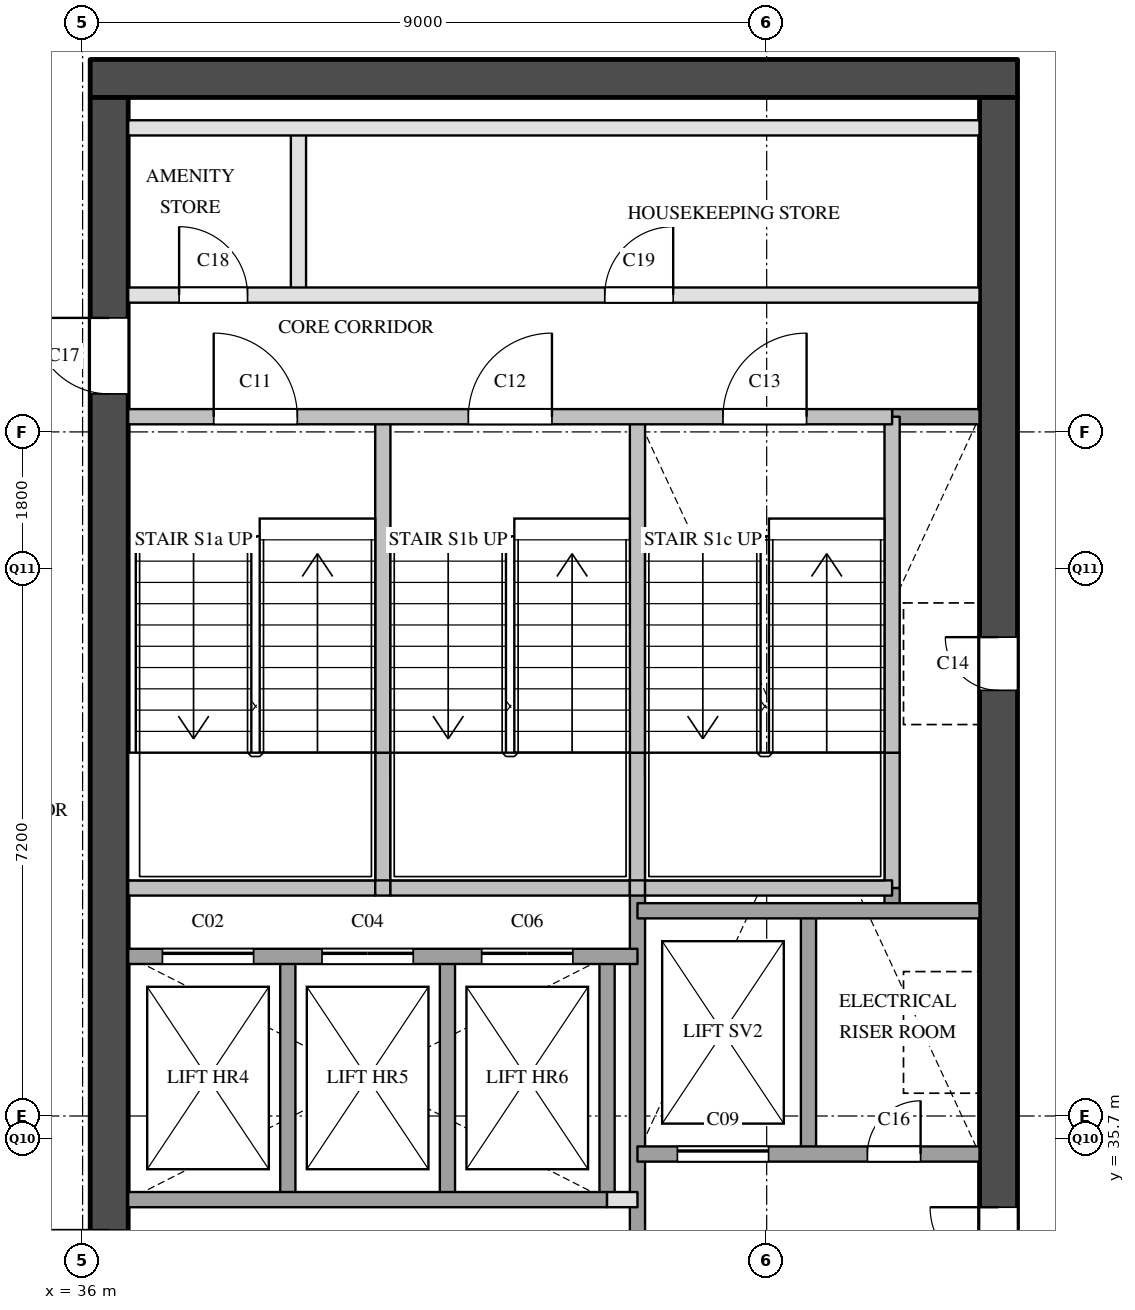
"""IFC4 building model, lengths in metres.
Left out: names, types, materials, properties, quantities, classifications, styles, units other than length and angle.
Written with IfcOpenShell. Run it as: python <this file> out.ifc"""

import sys

from ifc_helpers import new_model, si_unit, direction, frame, frame_2d, origin, place, context, subcontext, project, spatial, rectangle, extrude, element, fill, save


model = new_model("IFC4")
c1 = context("Model", 3, precision=1e-05, world=origin(), true_north=direction((0.0, 1.0)))
c2 = subcontext(c1, "Body", "Model", "MODEL_VIEW")
j1 = project(units=[si_unit("LENGTHUNIT", "METRE"), si_unit("PLANEANGLEUNIT", "RADIAN")], contexts=[c1])
p1 = place(None, origin())
s1 = spatial("IfcSite", under=j1, at=p1, CompositionType="ELEMENT")
p2 = place(p1, origin())
s2 = spatial("IfcBuilding", under=s1, at=p2, CompositionType="ELEMENT")
p3 = place(p2, frame((0.0, 0.0, 134.9)))
s3 = spatial("IfcBuildingStorey", under=s2, at=p3, CompositionType="ELEMENT", Elevation=134.9)
p4 = place(p3, frame((36.1, 49.65, 0.0), z_axis=(0.0, 0.0, 1.0), x_axis=(1.0, 0.0, 0.0)))
e1 = element("IfcWall", 1, at=p4, inside=s3, PredefinedType="SHEAR", context=c2, shape_type="SweptSolid", body=[
    extrude(rectangle(XDim=12.2, YDim=0.5, at=frame_2d((6.1, 0.0))), origin(), (0.0, 0.0, 1.0), 3.6),
])
p5 = place(p3, frame((36.35, 29.1, 0.0), z_axis=(0.0, 0.0, 1.0), x_axis=(0.0, 1.0, 0.0)))
e2 = element("IfcWall", 2, at=p5, inside=s3, PredefinedType="SHEAR", context=c2, shape_type="SweptSolid", body=[
    extrude(rectangle(XDim=20.3, YDim=0.5, at=frame_2d((10.15, 0.0))), origin(), (0.0, 0.0, 1.0), 3.6),
])
p6 = place(p5, frame((3.6, 0.0, 0.0)))
e3 = element("IfcOpeningElement", 3, at=p6, cuts=e2, PredefinedType="OPENING", context=c2, shape_type="SweptSolid", body=[
    extrude(rectangle(XDim=1.8, YDim=2.1, at=frame_2d((0.9, 1.05))), frame((0.0, 0.26, 0.0), z_axis=(0.0, -1.0, 0.0), x_axis=(1.0, 0.0, 0.0)), (0.0, 0.0, 1.0), 0.52),
])
p7 = place(p5, frame((16.4, 0.0, 0.0)))
e4 = element("IfcOpeningElement", 4, at=p7, cuts=e2, PredefinedType="OPENING", context=c2, shape_type="SweptSolid", body=[
    extrude(rectangle(XDim=1.0, YDim=2.1, at=frame_2d((0.5, 1.05))), frame((0.0, 0.26, 0.0), z_axis=(0.0, -1.0, 0.0), x_axis=(1.0, 0.0, 0.0)), (0.0, 0.0, 1.0), 0.52),
])
p8 = place(p3, frame((48.05, 29.1, 0.0), z_axis=(0.0, 0.0, 1.0), x_axis=(0.0, 1.0, 0.0)))
e5 = element("IfcWall", 5, at=p8, inside=s3, PredefinedType="SHEAR", context=c2, shape_type="SweptSolid", body=[
    extrude(rectangle(XDim=20.3, YDim=0.5, at=frame_2d((10.15, 0.0))), origin(), (0.0, 0.0, 1.0), 3.6),
])
p9 = place(p8, frame((12.5, 0.0, 0.0)))
e6 = element("IfcOpeningElement", 6, at=p9, cuts=e5, PredefinedType="OPENING", context=c2, shape_type="SweptSolid", body=[
    extrude(rectangle(XDim=0.7, YDim=2.1, at=frame_2d((0.35, 1.05))), frame((0.0, 0.26, 0.0), z_axis=(0.0, -1.0, 0.0), x_axis=(1.0, 0.0, 0.0)), (0.0, 0.0, 1.0), 0.52),
])
p10 = place(p8, frame((3.9, 0.0, 0.0)))
e7 = element("IfcOpeningElement", 7, at=p10, cuts=e5, PredefinedType="OPENING", context=c2, shape_type="SweptSolid", body=[
    extrude(rectangle(XDim=1.8, YDim=2.1, at=frame_2d((0.9, 1.05))), frame((0.0, 0.26, 0.0), z_axis=(0.0, -1.0, 0.0), x_axis=(1.0, 0.0, 0.0)), (0.0, 0.0, 1.0), 0.52),
])
p11 = place(p3, frame((38.7, 34.9, 0.0), z_axis=(0.0, 0.0, 1.0), x_axis=(0.0, 1.0, 0.0)))
e8 = element("IfcWall", 8, at=p11, inside=s3, PredefinedType="SOLIDWALL", context=c2, shape_type="SweptSolid", body=[
    extrude(rectangle(XDim=3.2, YDim=0.2, at=frame_2d((1.6, 0.0))), origin(), (0.0, 0.0, 1.0), 3.6),
])
p12 = place(p3, frame((38.84, 46.8, 0.0), z_axis=(0.0, 0.0, 1.0), x_axis=(0.0, 1.0, 0.0)))
e9 = element("IfcWall", 9, at=p12, inside=s3, PredefinedType="PARTITIONING", context=c2, shape_type="SweptSolid", body=[
    extrude(rectangle(XDim=2.2, YDim=0.2, at=frame_2d((1.1, 0.0))), origin(), (0.0, 0.0, 1.0), 3.6),
])
p13 = place(p3, frame((39.95, 39.0, 0.0), z_axis=(0.0, 0.0, 1.0), x_axis=(0.0, 1.0, 0.0)))
e10 = element("IfcWall", 10, at=p13, inside=s3, PredefinedType="SOLIDWALL", context=c2, shape_type="SweptSolid", body=[
    extrude(rectangle(XDim=1.78, YDim=0.2, at=frame_2d((0.89, 0.0))), origin(), (0.0, 0.0, 1.0), 3.6),
])
p14 = place(p3, frame((39.95, 40.78, 0.0), z_axis=(0.0, 0.0, 1.0), x_axis=(0.0, 1.0, 0.0)))
e11 = element("IfcWall", 11, at=p14, inside=s3, PredefinedType="SOLIDWALL", context=c2, shape_type="SweptSolid", body=[
    extrude(rectangle(XDim=4.42, YDim=0.2, at=frame_2d((2.21, 0.0))), origin(), (0.0, 0.0, 1.0), 3.6),
])
for number, where, z_axis, x_axis in (
    (12, (40.8, 34.9, 0.0), (0.0, 0.0, 1.0), (0.0, 1.0, 0.0)),
    (13, (42.9, 34.9, 0.0), (0.0, 0.0, 1.0), (0.0, 1.0, 0.0)),
):
    element("IfcWall", number, at=place(p3, frame(where, z_axis=z_axis, x_axis=x_axis)), inside=s3, PredefinedType="SOLIDWALL", context=c2, shape_type="SweptSolid", body=[
        extrude(rectangle(XDim=3.2, YDim=0.2, at=frame_2d((1.6, 0.0))), origin(), (0.0, 0.0, 1.0), 3.6),
    ])
p15 = place(p3, frame((43.3, 29.1, 0.0), z_axis=(0.0, 0.0, 1.0), x_axis=(0.0, 1.0, 0.0)))
e14 = element("IfcWall", 14, at=p15, inside=s3, PredefinedType="SOLIDWALL", context=c2, shape_type="SweptSolid", body=[
    extrude(rectangle(XDim=9.9, YDim=0.2, at=frame_2d((4.95, 0.0))), origin(), (0.0, 0.0, 1.0), 3.6),
])
p16 = place(p3, frame((43.3, 39.0, 0.0), z_axis=(0.0, 0.0, 1.0), x_axis=(0.0, 1.0, 0.0)))
e15 = element("IfcWall", 15, at=p16, inside=s3, PredefinedType="SOLIDWALL", context=c2, shape_type="SweptSolid", body=[
    extrude(rectangle(XDim=1.78, YDim=0.2, at=frame_2d((0.89, 0.0))), origin(), (0.0, 0.0, 1.0), 3.6),
])
p17 = place(p3, frame((43.3, 40.78, 0.0), z_axis=(0.0, 0.0, 1.0), x_axis=(0.0, 1.0, 0.0)))
e16 = element("IfcWall", 16, at=p17, inside=s3, PredefinedType="SOLIDWALL", context=c2, shape_type="SweptSolid", body=[
    extrude(rectangle(XDim=4.42, YDim=0.2, at=frame_2d((2.21, 0.0))), origin(), (0.0, 0.0, 1.0), 3.6),
])
p18 = place(p3, frame((45.55, 35.5, 0.0), z_axis=(0.0, 0.0, 1.0), x_axis=(0.0, 1.0, 0.0)))
e17 = element("IfcWall", 17, at=p18, inside=s3, PredefinedType="SOLIDWALL", context=c2, shape_type="SweptSolid", body=[
    extrude(rectangle(XDim=3.2, YDim=0.2, at=frame_2d((1.6, 0.0))), origin(), (0.0, 0.0, 1.0), 3.6),
])
p19 = place(p3, frame((46.65, 38.7, 0.0), z_axis=(0.0, 0.0, 1.0), x_axis=(0.0, 1.0, 0.0)))
e18 = element("IfcWall", 18, at=p19, inside=s3, PredefinedType="SOLIDWALL", context=c2, shape_type="SweptSolid", body=[
    extrude(rectangle(XDim=0.3, YDim=0.2, at=frame_2d((0.15, 0.0))), origin(), (0.0, 0.0, 1.0), 3.6),
])
p20 = place(p3, frame((46.65, 39.0, 0.0), z_axis=(0.0, 0.0, 1.0), x_axis=(0.0, 1.0, 0.0)))
e19 = element("IfcWall", 19, at=p20, inside=s3, PredefinedType="SOLIDWALL", context=c2, shape_type="SweptSolid", body=[
    extrude(rectangle(XDim=1.78, YDim=0.2, at=frame_2d((0.89, 0.0))), origin(), (0.0, 0.0, 1.0), 3.6),
])
p21 = place(p3, frame((46.65, 40.78, 0.0), z_axis=(0.0, 0.0, 1.0), x_axis=(0.0, 1.0, 0.0)))
e20 = element("IfcWall", 20, at=p21, inside=s3, PredefinedType="SOLIDWALL", context=c2, shape_type="SweptSolid", body=[
    extrude(rectangle(XDim=4.42, YDim=0.2, at=frame_2d((2.21, 0.0))), origin(), (0.0, 0.0, 1.0), 3.6),
])
p22 = place(p3, frame((42.9, 34.9, 0.0), z_axis=(0.0, 0.0, 1.0), x_axis=(1.0, 0.0, 0.0)))
e21 = element("IfcWall", 21, at=p22, inside=s3, PredefinedType="PARTITIONING", context=c2, shape_type="SweptSolid", body=[
    extrude(rectangle(XDim=0.4, YDim=0.2, at=frame_2d((0.2, 0.0))), origin(), (0.0, 0.0, 1.0), 3.6),
])
p23 = place(p3, frame((36.6, 34.9, 0.0), z_axis=(0.0, 0.0, 1.0), x_axis=(1.0, 0.0, 0.0)))
e22 = element("IfcWall", 22, at=p23, inside=s3, PredefinedType="SOLIDWALL", context=c2, shape_type="SweptSolid", body=[
    extrude(rectangle(XDim=6.3, YDim=0.2, at=frame_2d((3.15, 0.0))), origin(), (0.0, 0.0, 1.0), 3.6),
])
p24 = place(p3, frame((43.3, 35.5, 0.0), z_axis=(0.0, 0.0, 1.0), x_axis=(1.0, 0.0, 0.0)))
e23 = element("IfcWall", 23, at=p24, inside=s3, PredefinedType="SOLIDWALL", context=c2, shape_type="SweptSolid", body=[
    extrude(rectangle(XDim=4.5, YDim=0.2, at=frame_2d((2.25, 0.0))), origin(), (0.0, 0.0, 1.0), 3.6),
])
p25 = place(p24, frame((0.525, 0.0, 0.0)))
e24 = element("IfcOpeningElement", 24, at=p25, cuts=e23, PredefinedType="OPENING", context=c2, shape_type="SweptSolid", body=[
    extrude(rectangle(XDim=1.2, YDim=2.1, at=frame_2d((0.6, 1.05))), frame((0.0, 0.11, 0.0), z_axis=(0.0, -1.0, 0.0), x_axis=(1.0, 0.0, 0.0)), (0.0, 0.0, 1.0), 0.22),
])
p26 = place(p24, frame((3.025, 0.0, 0.0)))
e25 = element("IfcOpeningElement", 25, at=p26, cuts=e23, PredefinedType="OPENING", context=c2, shape_type="SweptSolid", body=[
    extrude(rectangle(XDim=0.7, YDim=2.1, at=frame_2d((0.35, 1.05))), frame((0.0, 0.11, 0.0), z_axis=(0.0, -1.0, 0.0), x_axis=(1.0, 0.0, 0.0)), (0.0, 0.0, 1.0), 0.22),
])
p27 = place(p3, frame((36.6, 38.1, 0.0), z_axis=(0.0, 0.0, 1.0), x_axis=(1.0, 0.0, 0.0)))
e26 = element("IfcWall", 26, at=p27, inside=s3, PredefinedType="SOLIDWALL", context=c2, shape_type="SweptSolid", body=[
    extrude(rectangle(XDim=6.7, YDim=0.2, at=frame_2d((3.35, 0.0))), origin(), (0.0, 0.0, 1.0), 3.6),
])
p28 = place(p27, frame((0.45, 0.0, 0.0)))
e27 = element("IfcOpeningElement", 27, at=p28, cuts=e26, PredefinedType="OPENING", context=c2, shape_type="SweptSolid", body=[
    extrude(rectangle(XDim=1.2, YDim=2.1, at=frame_2d((0.6, 1.05))), frame((0.0, 0.11, 0.0), z_axis=(0.0, -1.0, 0.0), x_axis=(1.0, 0.0, 0.0)), (0.0, 0.0, 1.0), 0.22),
])
p29 = place(p27, frame((2.55, 0.0, 0.0)))
e28 = element("IfcOpeningElement", 28, at=p29, cuts=e26, PredefinedType="OPENING", context=c2, shape_type="SweptSolid", body=[
    extrude(rectangle(XDim=1.2, YDim=2.1, at=frame_2d((0.6, 1.05))), frame((0.0, 0.11, 0.0), z_axis=(0.0, -1.0, 0.0), x_axis=(1.0, 0.0, 0.0)), (0.0, 0.0, 1.0), 0.22),
])
p30 = place(p27, frame((4.65, 0.0, 0.0)))
e29 = element("IfcOpeningElement", 29, at=p30, cuts=e26, PredefinedType="OPENING", context=c2, shape_type="SweptSolid", body=[
    extrude(rectangle(XDim=1.2, YDim=2.1, at=frame_2d((0.6, 1.05))), frame((0.0, 0.11, 0.0), z_axis=(0.0, -1.0, 0.0), x_axis=(1.0, 0.0, 0.0)), (0.0, 0.0, 1.0), 0.22),
])
p31 = place(p3, frame((43.3, 38.7, 0.0), z_axis=(0.0, 0.0, 1.0), x_axis=(1.0, 0.0, 0.0)))
e30 = element("IfcWall", 30, at=p31, inside=s3, PredefinedType="SOLIDWALL", context=c2, shape_type="SweptSolid", body=[
    extrude(rectangle(XDim=4.5, YDim=0.2, at=frame_2d((2.25, 0.0))), origin(), (0.0, 0.0, 1.0), 3.6),
])
p32 = place(p3, frame((36.6, 39.0, 0.0), z_axis=(0.0, 0.0, 1.0), x_axis=(1.0, 0.0, 0.0)))
e31 = element("IfcWall", 31, at=p32, inside=s3, PredefinedType="SOLIDWALL", context=c2, shape_type="SweptSolid", body=[
    extrude(rectangle(XDim=3.25, YDim=0.2, at=frame_2d((1.625, 0.0))), origin(), (0.0, 0.0, 1.0), 3.6),
])
p33 = place(p3, frame((39.85, 39.0, 0.0), z_axis=(0.0, 0.0, 1.0), x_axis=(1.0, 0.0, 0.0)))
e32 = element("IfcWall", 32, at=p33, inside=s3, PredefinedType="SOLIDWALL", context=c2, shape_type="SweptSolid", body=[
    extrude(rectangle(XDim=0.2, YDim=0.2, at=frame_2d((0.1, 0.0))), origin(), (0.0, 0.0, 1.0), 3.6),
])
p34 = place(p3, frame((40.05, 39.0, 0.0), z_axis=(0.0, 0.0, 1.0), x_axis=(1.0, 0.0, 0.0)))
e33 = element("IfcWall", 33, at=p34, inside=s3, PredefinedType="SOLIDWALL", context=c2, shape_type="SweptSolid", body=[
    extrude(rectangle(XDim=3.15, YDim=0.2, at=frame_2d((1.575, 0.0))), origin(), (0.0, 0.0, 1.0), 3.6),
])
p35 = place(p3, frame((43.2, 39.0, 0.0), z_axis=(0.0, 0.0, 1.0), x_axis=(1.0, 0.0, 0.0)))
e34 = element("IfcWall", 34, at=p35, inside=s3, PredefinedType="SOLIDWALL", context=c2, shape_type="SweptSolid", body=[
    extrude(rectangle(XDim=0.2, YDim=0.2, at=frame_2d((0.1, 0.0))), origin(), (0.0, 0.0, 1.0), 3.6),
])
p36 = place(p3, frame((43.4, 39.0, 0.0), z_axis=(0.0, 0.0, 1.0), x_axis=(1.0, 0.0, 0.0)))
e35 = element("IfcWall", 35, at=p36, inside=s3, PredefinedType="SOLIDWALL", context=c2, shape_type="SweptSolid", body=[
    extrude(rectangle(XDim=3.25, YDim=0.2, at=frame_2d((1.625, 0.0))), origin(), (0.0, 0.0, 1.0), 3.6),
])
p37 = place(p3, frame((46.65, 45.2, 0.0), z_axis=(0.0, 0.0, 1.0), x_axis=(1.0, 0.0, 0.0)))
e36 = element("IfcWall", 36, at=p37, inside=s3, PredefinedType="SOLIDWALL", context=c2, shape_type="SweptSolid", body=[
    extrude(rectangle(XDim=1.15, YDim=0.2, at=frame_2d((0.575, 0.0))), origin(), (0.0, 0.0, 1.0), 3.6),
])
p38 = place(p3, frame((36.6, 45.2, 0.0), z_axis=(0.0, 0.0, 1.0), x_axis=(1.0, 0.0, 0.0)))
e37 = element("IfcWall", 37, at=p38, inside=s3, PredefinedType="SOLIDWALL", context=c2, shape_type="SweptSolid", body=[
    extrude(rectangle(XDim=10.05, YDim=0.2, at=frame_2d((5.025, 0.0))), origin(), (0.0, 0.0, 1.0), 3.6),
])
p39 = place(p38, frame((1.125, 0.0, 0.0)))
e38 = element("IfcOpeningElement", 38, at=p39, cuts=e37, PredefinedType="OPENING", context=c2, shape_type="SweptSolid", body=[
    extrude(rectangle(XDim=1.1, YDim=2.1, at=frame_2d((0.55, 1.05))), frame((0.0, 0.11, 0.0), z_axis=(0.0, -1.0, 0.0), x_axis=(1.0, 0.0, 0.0)), (0.0, 0.0, 1.0), 0.22),
])
p40 = place(p38, frame((4.475, 0.0, 0.0)))
e39 = element("IfcOpeningElement", 39, at=p40, cuts=e37, PredefinedType="OPENING", context=c2, shape_type="SweptSolid", body=[
    extrude(rectangle(XDim=1.1, YDim=2.1, at=frame_2d((0.55, 1.05))), frame((0.0, 0.11, 0.0), z_axis=(0.0, -1.0, 0.0), x_axis=(1.0, 0.0, 0.0)), (0.0, 0.0, 1.0), 0.22),
])
p41 = place(p38, frame((7.825, 0.0, 0.0)))
e40 = element("IfcOpeningElement", 40, at=p41, cuts=e37, PredefinedType="OPENING", context=c2, shape_type="SweptSolid", body=[
    extrude(rectangle(XDim=1.1, YDim=2.1, at=frame_2d((0.55, 1.05))), frame((0.0, 0.11, 0.0), z_axis=(0.0, -1.0, 0.0), x_axis=(1.0, 0.0, 0.0)), (0.0, 0.0, 1.0), 0.22),
])
p42 = place(p3, frame((36.6, 46.8, 0.0), z_axis=(0.0, 0.0, 1.0), x_axis=(1.0, 0.0, 0.0)))
e41 = element("IfcWall", 41, at=p42, inside=s3, PredefinedType="PARTITIONING", context=c2, shape_type="SweptSolid", body=[
    extrude(rectangle(XDim=11.2, YDim=0.2, at=frame_2d((5.6, 0.0))), origin(), (0.0, 0.0, 1.0), 3.6),
])
p43 = place(p42, frame((0.67, 0.0, 0.0)))
e42 = element("IfcOpeningElement", 42, at=p43, cuts=e41, PredefinedType="OPENING", context=c2, shape_type="SweptSolid", body=[
    extrude(rectangle(XDim=0.9, YDim=2.1, at=frame_2d((0.45, 1.05))), frame((0.0, 0.11, 0.0), z_axis=(0.0, -1.0, 0.0), x_axis=(1.0, 0.0, 0.0)), (0.0, 0.0, 1.0), 0.22),
])
p44 = place(p42, frame((6.27, 0.0, 0.0)))
e43 = element("IfcOpeningElement", 43, at=p44, cuts=e41, PredefinedType="OPENING", context=c2, shape_type="SweptSolid", body=[
    extrude(rectangle(XDim=0.9, YDim=2.1, at=frame_2d((0.45, 1.05))), frame((0.0, 0.11, 0.0), z_axis=(0.0, -1.0, 0.0), x_axis=(1.0, 0.0, 0.0)), (0.0, 0.0, 1.0), 0.22),
])
p45 = place(p3, frame((36.6, 49.0, 0.0), z_axis=(0.0, 0.0, 1.0), x_axis=(1.0, 0.0, 0.0)))
e44 = element("IfcWall", 44, at=p45, inside=s3, PredefinedType="PARTITIONING", context=c2, shape_type="SweptSolid", body=[
    extrude(rectangle(XDim=11.2, YDim=0.2, at=frame_2d((5.6, 0.0))), origin(), (0.0, 0.0, 1.0), 3.6),
])
p46 = place(p28, origin())
e45 = element("IfcDoor", 45, at=p46, inside=s3, OperationType="SLIDING_TO_LEFT", PredefinedType="DOOR", context=c2, shape_type="SweptSolid", body=[
    extrude(rectangle(XDim=1.2, YDim=2.1, at=frame_2d((0.6, 1.05))), frame((0.0, 0.025, 0.0), z_axis=(0.0, -1.0, 0.0), x_axis=(1.0, 0.0, 0.0)), (0.0, 0.0, 1.0), 0.05),
])
fill(e27, e45)
p47 = place(p29, origin())
e46 = element("IfcDoor", 46, at=p47, inside=s3, OperationType="SLIDING_TO_LEFT", PredefinedType="DOOR", context=c2, shape_type="SweptSolid", body=[
    extrude(rectangle(XDim=1.2, YDim=2.1, at=frame_2d((0.6, 1.05))), frame((0.0, 0.025, 0.0), z_axis=(0.0, -1.0, 0.0), x_axis=(1.0, 0.0, 0.0)), (0.0, 0.0, 1.0), 0.05),
])
fill(e28, e46)
p48 = place(p30, origin())
e47 = element("IfcDoor", 47, at=p48, inside=s3, OperationType="SLIDING_TO_LEFT", PredefinedType="DOOR", context=c2, shape_type="SweptSolid", body=[
    extrude(rectangle(XDim=1.2, YDim=2.1, at=frame_2d((0.6, 1.05))), frame((0.0, 0.025, 0.0), z_axis=(0.0, -1.0, 0.0), x_axis=(1.0, 0.0, 0.0)), (0.0, 0.0, 1.0), 0.05),
])
fill(e29, e47)
p49 = place(p25, origin())
e48 = element("IfcDoor", 48, at=p49, inside=s3, OperationType="SLIDING_TO_LEFT", PredefinedType="DOOR", context=c2, shape_type="SweptSolid", body=[
    extrude(rectangle(XDim=1.2, YDim=2.1, at=frame_2d((0.6, 1.05))), frame((0.0, 0.025, 0.0), z_axis=(0.0, -1.0, 0.0), x_axis=(1.0, 0.0, 0.0)), (0.0, 0.0, 1.0), 0.05),
])
fill(e24, e48)
p50 = place(p6, origin())
e49 = element("IfcDoor", 49, at=p50, inside=s3, OperationType="DOUBLE_DOOR_SINGLE_SWING", PredefinedType="DOOR", context=c2, shape_type="SweptSolid", body=[
    extrude(rectangle(XDim=1.8, YDim=2.1, at=frame_2d((0.9, 1.05))), frame((0.0, 0.025, 0.0), z_axis=(0.0, -1.0, 0.0), x_axis=(1.0, 0.0, 0.0)), (0.0, 0.0, 1.0), 0.05),
])
fill(e3, e49)
p51 = place(p39, origin())
e50 = element("IfcDoor", 50, at=p51, inside=s3, OperationType="SINGLE_SWING_LEFT", PredefinedType="DOOR", context=c2, shape_type="SweptSolid", body=[
    extrude(rectangle(XDim=1.1, YDim=2.1, at=frame_2d((0.55, 1.05))), frame((0.0, 0.025, 0.0), z_axis=(0.0, -1.0, 0.0), x_axis=(1.0, 0.0, 0.0)), (0.0, 0.0, 1.0), 0.05),
])
fill(e38, e50)
p52 = place(p40, origin())
e51 = element("IfcDoor", 51, at=p52, inside=s3, OperationType="SINGLE_SWING_RIGHT", PredefinedType="DOOR", context=c2, shape_type="SweptSolid", body=[
    extrude(rectangle(XDim=1.1, YDim=2.1, at=frame_2d((0.55, 1.05))), frame((0.0, 0.025, 0.0), z_axis=(0.0, -1.0, 0.0), x_axis=(1.0, 0.0, 0.0)), (0.0, 0.0, 1.0), 0.05),
])
fill(e39, e51)
p53 = place(p41, origin())
e52 = element("IfcDoor", 52, at=p53, inside=s3, OperationType="SINGLE_SWING_RIGHT", PredefinedType="DOOR", context=c2, shape_type="SweptSolid", body=[
    extrude(rectangle(XDim=1.1, YDim=2.1, at=frame_2d((0.55, 1.05))), frame((0.0, 0.025, 0.0), z_axis=(0.0, -1.0, 0.0), x_axis=(1.0, 0.0, 0.0)), (0.0, 0.0, 1.0), 0.05),
])
fill(e40, e52)
p54 = place(p9, origin())
e53 = element("IfcDoor", 53, at=p54, inside=s3, OperationType="SINGLE_SWING_RIGHT", PredefinedType="DOOR", context=c2, shape_type="SweptSolid", body=[
    extrude(rectangle(XDim=0.7, YDim=2.1, at=frame_2d((0.35, 1.05))), frame((0.0, 0.025, 0.0), z_axis=(0.0, -1.0, 0.0), x_axis=(1.0, 0.0, 0.0)), (0.0, 0.0, 1.0), 0.05),
])
fill(e6, e53)
p55 = place(p10, origin())
e54 = element("IfcDoor", 54, at=p55, inside=s3, OperationType="DOUBLE_DOOR_SINGLE_SWING", PredefinedType="DOOR", context=c2, shape_type="SweptSolid", body=[
    extrude(rectangle(XDim=1.8, YDim=2.1, at=frame_2d((0.9, 1.05))), frame((0.0, 0.025, 0.0), z_axis=(0.0, -1.0, 0.0), x_axis=(1.0, 0.0, 0.0)), (0.0, 0.0, 1.0), 0.05),
])
fill(e7, e54)
p56 = place(p26, origin())
e55 = element("IfcDoor", 55, at=p56, inside=s3, OperationType="SINGLE_SWING_RIGHT", PredefinedType="DOOR", context=c2, shape_type="SweptSolid", body=[
    extrude(rectangle(XDim=0.7, YDim=2.1, at=frame_2d((0.35, 1.05))), frame((0.0, 0.025, 0.0), z_axis=(0.0, -1.0, 0.0), x_axis=(1.0, 0.0, 0.0)), (0.0, 0.0, 1.0), 0.05),
])
fill(e25, e55)
p57 = place(p7, origin())
e56 = element("IfcDoor", 56, at=p57, inside=s3, OperationType="SINGLE_SWING_RIGHT", PredefinedType="DOOR", context=c2, shape_type="SweptSolid", body=[
    extrude(rectangle(XDim=1.0, YDim=2.1, at=frame_2d((0.5, 1.05))), frame((0.0, 0.025, 0.0), z_axis=(0.0, -1.0, 0.0), x_axis=(1.0, 0.0, 0.0)), (0.0, 0.0, 1.0), 0.05),
])
fill(e4, e56)
p58 = place(p43, origin())
e57 = element("IfcDoor", 57, at=p58, inside=s3, OperationType="SINGLE_SWING_LEFT", PredefinedType="DOOR", context=c2, shape_type="SweptSolid", body=[
    extrude(rectangle(XDim=0.9, YDim=2.1, at=frame_2d((0.45, 1.05))), frame((0.0, 0.025, 0.0), z_axis=(0.0, -1.0, 0.0), x_axis=(1.0, 0.0, 0.0)), (0.0, 0.0, 1.0), 0.05),
])
fill(e42, e57)
p59 = place(p44, origin())
e58 = element("IfcDoor", 58, at=p59, inside=s3, OperationType="SINGLE_SWING_RIGHT", PredefinedType="DOOR", context=c2, shape_type="SweptSolid", body=[
    extrude(rectangle(XDim=0.9, YDim=2.1, at=frame_2d((0.45, 1.05))), frame((0.0, 0.025, 0.0), z_axis=(0.0, -1.0, 0.0), x_axis=(1.0, 0.0, 0.0)), (0.0, 0.0, 1.0), 0.05),
])
fill(e43, e58)
save(model, sys.argv[1])
